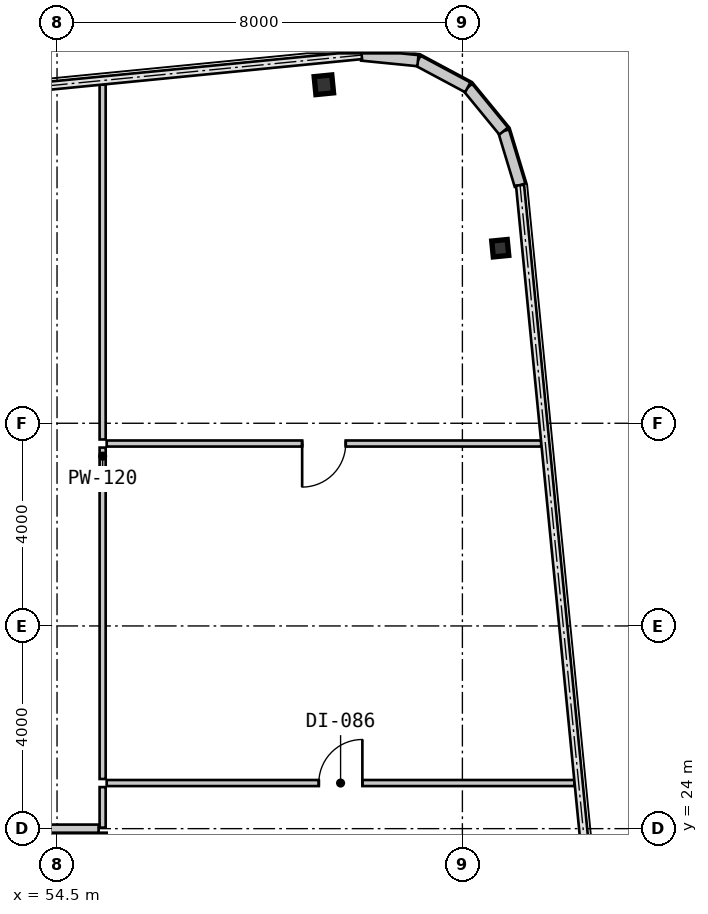
"""IFC4 building model, lengths in metres.
Left out: names, types, materials, properties, quantities, classifications, styles, units other than length and angle.
Written with IfcOpenShell. Run it as: python <this file> out.ifc"""

import sys

from ifc_helpers import new_model, si_unit, direction, frame, frame_2d, origin, origin_2d, place, context, subcontext, project, spatial, rectangle, i_section, extrude, source, transform, mapped, element, fill, save


model = new_model("IFC4")
c1 = context("Model", 3, precision=1e-05, world=origin(), true_north=direction((0.0, 1.0)))
c2 = subcontext(c1, "Body", "Model", "MODEL_VIEW")
j1 = project(units=[si_unit("LENGTHUNIT", "METRE"), si_unit("PLANEANGLEUNIT", "RADIAN")], contexts=[c1])
p1 = place(None, origin())
s1 = spatial("IfcSite", under=j1, at=p1, CompositionType="ELEMENT")
p2 = place(p1, origin())
s2 = spatial("IfcBuilding", under=s1, at=p2, CompositionType="ELEMENT")
p3 = place(p2, frame((0.0, 0.0, 93.45)))
s3 = spatial("IfcBuildingStorey", under=s2, at=p3, CompositionType="ELEMENT", Elevation=93.45)
m1 = source(origin(), c2, "Body", "SweptSolid", [
    extrude(i_section(OverallWidth=0.35, OverallDepth=0.356, WebThickness=0.018, FlangeThickness=0.028, at=origin_2d()), origin(), (0.0, 0.0, 1.0), 3.15),
])
p4 = place(p3, frame((59.766, 38.68, 0.0), z_axis=(0.0, 0.0, 1.0), x_axis=(0.995227399982, 0.097582899759, 0.0)))
e1 = element("IfcColumn", 1, at=p4, inside=s3, PredefinedType="COLUMN", context=c2, shape_type="MappedRepresentation", body=[
    mapped(m1, transform((0.0, 0.0, 0.0), scale=1.0)),
])
m2 = source(origin(), c2, "Body", "SweptSolid", [
    extrude(i_section(OverallWidth=0.307, OverallDepth=0.315, WebThickness=0.012, FlangeThickness=0.019, at=origin_2d()), origin(), (0.0, 0.0, 1.0), 3.15),
])
p5 = place(p3, frame((63.247, 35.454, 0.0), z_axis=(0.0, 0.0, 1.0), x_axis=(0.995227399982, 0.097582899759, 0.0)))
e2 = element("IfcColumn", 2, at=p5, inside=s3, PredefinedType="COLUMN", context=c2, shape_type="MappedRepresentation", body=[
    mapped(m2, transform((0.0, 0.0, 0.0), scale=1.0)),
])
m3 = source(origin(), c2, "Body", "SweptSolid", [
    extrude(rectangle(XDim=1.116, YDim=0.22, at=frame_2d((0.558, 0.0))), origin(), (0.0, 0.0, 1.0), 2.93),
])
p6 = place(p3, frame((63.638, 36.698, 0.0), z_axis=(0.0, 0.0, 1.0), x_axis=(-0.289855603468, 0.957070388811, 0.0)))
e3 = element("IfcWall", 3, at=p6, inside=s3, PredefinedType="SOLIDWALL", context=c2, shape_type="MappedRepresentation", body=[
    mapped(m3, transform((0.0, 0.0, 0.0), scale=1.0)),
])
m4 = source(origin(), c2, "Body", "SweptSolid", [
    extrude(rectangle(XDim=1.116, YDim=0.22, at=frame_2d((0.558, 0.0))), origin(), (0.0, 0.0, 1.0), 2.93),
])
p7 = place(p3, frame((63.314, 37.766, 0.0), z_axis=(0.0, 0.0, 1.0), x_axis=(-0.634095287989, 0.773254916409, 0.0)))
e4 = element("IfcWall", 4, at=p7, inside=s3, PredefinedType="SOLIDWALL", context=c2, shape_type="MappedRepresentation", body=[
    mapped(m4, transform((0.0, 0.0, 0.0), scale=1.0)),
])
for number, where, z_axis, x_axis in (
    (5, (62.607, 38.629, 0.0), (0.0, 0.0, 1.0), (-0.882, 0.472, 0.0)),
    (6, (61.623, 39.156, 0.0), (0.0, 0.0, 1.0), (-0.995, 0.098, 0.0)),
):
    element("IfcWall", number, at=place(p3, frame(where, z_axis=z_axis, x_axis=x_axis)), inside=s3, PredefinedType="SOLIDWALL", context=c2, shape_type="MappedRepresentation", body=[
        mapped(m3, transform((0.0, 0.0, 0.0), scale=1.0)),
    ])
m5 = source(origin(), c2, "Body", "SweptSolid", [
    extrude(rectangle(XDim=6.3, YDim=0.16, at=frame_2d((3.15, 0.0))), origin(), (0.0, 0.0, 1.0), 2.93),
])
p8 = place(p3, frame((55.4, 23.92, 0.0), z_axis=(0.0, 0.0, 1.0), x_axis=(0.0, -1.0, 0.0)))
e7 = element("IfcWall", 7, at=p8, inside=s3, PredefinedType="PARTITIONING", context=c2, shape_type="MappedRepresentation", body=[
    mapped(m5, transform((0.0, 0.0, 0.0), scale=1.0)),
])
m6 = source(origin(), c2, "Body", "SweptSolid", [
    extrude(rectangle(XDim=0.92, YDim=2.1, at=frame_2d((0.46, 1.05))), frame((0.0, 0.09, 0.0), z_axis=(0.0, -1.0, 0.0), x_axis=(1.0, 0.0, 0.0)), (0.0, 0.0, 1.0), 0.18),
])
p9 = place(p8, frame((2.69, 0.0, 0.0)))
e8 = element("IfcOpeningElement", 8, at=p9, cuts=e7, PredefinedType="OPENING", context=c2, shape_type="MappedRepresentation", body=[
    mapped(m6, transform((0.0, 0.0, 0.0), scale=1.0)),
])
m7 = source(origin(), c2, "Body", "SweptSolid", [
    extrude(rectangle(XDim=3.016, YDim=0.16, at=frame_2d((1.508, 0.0))), origin(), (0.0, 0.0, 1.0), 2.93),
])
p10 = place(p3, frame((52.304, 24.0, 0.0), z_axis=(0.0, 0.0, 1.0), x_axis=(1.0, 0.0, 0.0)))
e9 = element("IfcWall", 9, at=p10, inside=s3, PredefinedType="PARTITIONING", context=c2, shape_type="MappedRepresentation", body=[
    mapped(m7, transform((0.0, 0.0, 0.0), scale=1.0)),
])
m8 = source(origin(), c2, "Body", "SweptSolid", [
    extrude(rectangle(XDim=9.232, YDim=0.12, at=frame_2d((4.616, 0.0))), origin(), (0.0, 0.0, 1.0), 2.93),
])
p11 = place(p3, frame((55.48, 24.9, 0.0), z_axis=(0.0, 0.0, 1.0), x_axis=(1.0, 0.0, 0.0)))
e10 = element("IfcWall", 10, at=p11, inside=s3, PredefinedType="PARTITIONING", context=c2, shape_type="MappedRepresentation", body=[
    mapped(m8, transform((0.0, 0.0, 0.0), scale=1.0)),
])
m9 = source(origin(), c2, "Body", "SweptSolid", [
    extrude(rectangle(XDim=0.86, YDim=2.1, at=frame_2d((0.43, 1.05))), frame((0.0, 0.07, 0.0), z_axis=(0.0, -1.0, 0.0), x_axis=(1.0, 0.0, 0.0)), (0.0, 0.0, 1.0), 0.14),
])
p12 = place(p11, frame((4.186, 0.0, 0.0)))
e11 = element("IfcOpeningElement", 11, at=p12, cuts=e10, PredefinedType="OPENING", context=c2, shape_type="MappedRepresentation", body=[
    mapped(m9, transform((0.0, 0.0, 0.0), scale=1.0)),
])
m10 = source(origin(), c2, "Body", "SweptSolid", [
    extrude(rectangle(XDim=0.8, YDim=0.12, at=frame_2d((0.4, 0.0))), origin(), (0.0, 0.0, 1.0), 2.93),
])
p13 = place(p3, frame((55.4, 24.02, 0.0), z_axis=(0.0, 0.0, 1.0), x_axis=(0.0, 1.0, 0.0)))
e12 = element("IfcWall", 12, at=p13, inside=s3, PredefinedType="PARTITIONING", context=c2, shape_type="MappedRepresentation", body=[
    mapped(m10, transform((0.0, 0.0, 0.0), scale=1.0)),
])
m11 = source(origin(), c2, "Body", "SweptSolid", [
    extrude(rectangle(XDim=8.575, YDim=0.12, at=frame_2d((4.288, 0.0))), origin(), (0.0, 0.0, 1.0), 2.93),
])
p14 = place(p3, frame((55.48, 31.6, 0.0), z_axis=(0.0, 0.0, 1.0), x_axis=(1.0, 0.0, 0.0)))
e13 = element("IfcWall", 13, at=p14, inside=s3, PredefinedType="PARTITIONING", context=c2, shape_type="MappedRepresentation", body=[
    mapped(m11, transform((0.0, 0.0, 0.0), scale=1.0)),
])
p15 = place(p14, frame((3.857, 0.0, 0.0)))
e14 = element("IfcOpeningElement", 14, at=p15, cuts=e13, PredefinedType="OPENING", context=c2, shape_type="MappedRepresentation", body=[
    mapped(m9, transform((0.0, 0.0, 0.0), scale=1.0)),
])
m12 = source(origin(), c2, "Body", "SweptSolid", [
    extrude(rectangle(XDim=6.54, YDim=0.12, at=frame_2d((3.27, 0.0))), origin(), (0.0, 0.0, 1.0), 2.93),
])
p16 = place(p3, frame((55.4, 24.98, 0.0), z_axis=(0.0, 0.0, 1.0), x_axis=(0.0, 1.0, 0.0)))
e15 = element("IfcWall", 15, at=p16, inside=s3, PredefinedType="PARTITIONING", context=c2, shape_type="MappedRepresentation", body=[
    mapped(m12, transform((0.0, 0.0, 0.0), scale=1.0)),
])
m13 = source(origin(), c2, "Body", "SweptSolid", [
    extrude(rectangle(XDim=7.002, YDim=0.12, at=frame_2d((3.501, 0.0))), origin(), (0.0, 0.0, 1.0), 2.93),
])
p17 = place(p3, frame((55.4, 31.68, 0.0), z_axis=(0.0, 0.0, 1.0), x_axis=(0.0, 1.0, 0.0)))
e16 = element("IfcWall", 16, at=p17, inside=s3, PredefinedType="PARTITIONING", context=c2, shape_type="MappedRepresentation", body=[
    mapped(m13, transform((0.0, 0.0, 0.0), scale=1.0)),
])
m14 = source(origin(), c2, "Body", "SweptSolid", [
    extrude(rectangle(XDim=0.86, YDim=2.1, at=frame_2d((0.43, 1.05))), frame((0.0, 0.025, 0.0), z_axis=(0.0, -1.0, 0.0), x_axis=(1.0, 0.0, 0.0)), (0.0, 0.0, 1.0), 0.05),
])
p18 = place(p12, origin())
e17 = element("IfcDoor", 17, at=p18, inside=s3, OperationType="SINGLE_SWING_RIGHT", PredefinedType="DOOR", context=c2, shape_type="MappedRepresentation", body=[
    mapped(m14, transform((0.0, 0.0, 0.0), scale=1.0)),
])
fill(e11, e17)
p19 = place(p15, frame((0.86, 0.0, 0.0), z_axis=(0.0, 0.0, 1.0), x_axis=(-1.0, 0.0, 0.0)))
e18 = element("IfcDoor", 18, at=p19, inside=s3, OperationType="SINGLE_SWING_RIGHT", PredefinedType="DOOR", context=c2, shape_type="MappedRepresentation", body=[
    mapped(m14, transform((0.0, 0.0, 0.0), scale=1.0)),
])
fill(e14, e18)
save(model, sys.argv[1])
